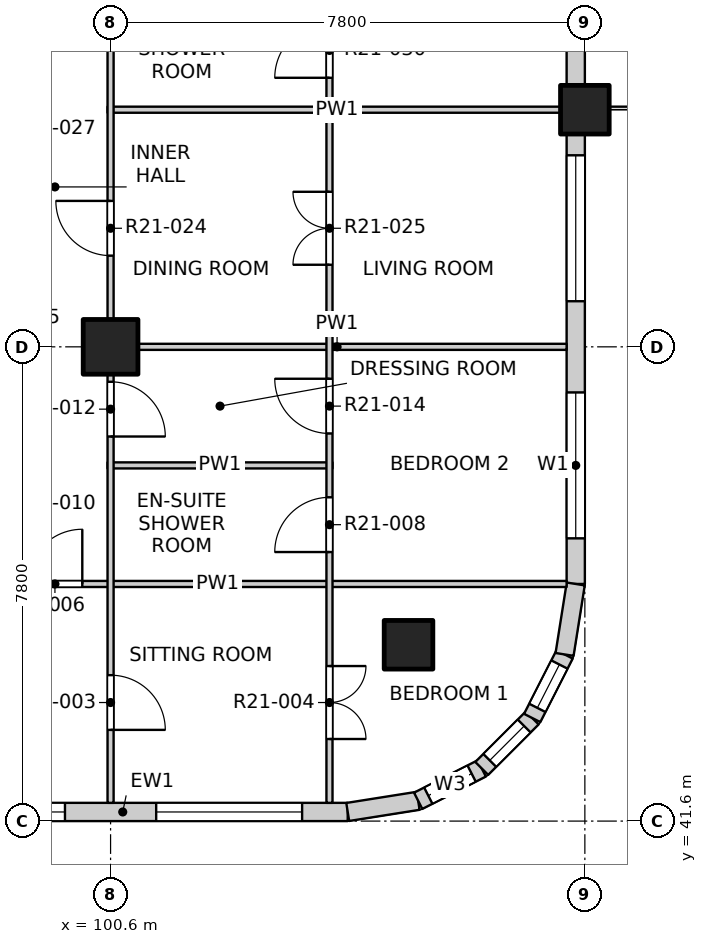
"""IFC4 building model, lengths in metres.
Left out: names, types, materials, properties, quantities, classifications, styles, units other than length and angle.
Written with IfcOpenShell. Run it as: python <this file> out.ifc"""

import sys

from ifc_helpers import new_model, si_unit, direction, frame, frame_2d, origin, origin_2d, place, context, subcontext, project, spatial, rectangle, extrude, element, fill, save


model = new_model("IFC4")
c1 = context("Model", 3, precision=1e-05, world=origin(), true_north=direction((0.0, 1.0)))
c2 = subcontext(c1, "Body", "Model", "MODEL_VIEW")
j1 = project(units=[si_unit("LENGTHUNIT", "METRE"), si_unit("PLANEANGLEUNIT", "RADIAN")], contexts=[c1])
p1 = place(None, origin())
s1 = spatial("IfcSite", under=j1, at=p1, CompositionType="ELEMENT")
p2 = place(p1, origin())
s2 = spatial("IfcBuilding", under=s1, at=p2, CompositionType="ELEMENT")
p3 = place(p2, frame((0.0, 0.0, 221.1)))
s3 = spatial("IfcBuildingStorey", under=s2, at=p3, CompositionType="ELEMENT", Elevation=221.1)
for number, where, z_axis, x_axis in (
    (1, (105.5, 44.5, -0.25), (0.0, 0.0, 1.0), (1.0, 0.0, 0.0)),
    (2, (108.4, 53.3, -0.25), (0.0, 0.0, 1.0), (1.0, 0.0, 0.0)),
):
    element("IfcColumn", number, at=place(p3, frame(where, z_axis=z_axis, x_axis=x_axis)), inside=s3, PredefinedType="COLUMN", context=c2, shape_type="SweptSolid", body=[
        extrude(rectangle(XDim=0.8, YDim=0.8, at=origin_2d()), origin(), (0.0, 0.0, 1.0), 3.4),
    ])
p4 = place(p3, frame((100.6, 49.4, -0.25), z_axis=(0.0, 0.0, 1.0), x_axis=(1.0, 0.0, 0.0)))
e3 = element("IfcColumn", 3, at=p4, inside=s3, PredefinedType="COLUMN", context=c2, shape_type="SweptSolid", body=[
    extrude(rectangle(XDim=0.9, YDim=0.9, at=origin_2d()), origin(), (0.0, 0.0, 1.0), 3.4),
])
p5 = place(p3, frame((97.1, 41.75, 0.0), z_axis=(0.0, 0.0, 1.0), x_axis=(1.0, 0.0, 0.0)))
e4 = element("IfcWall", 4, at=p5, inside=s3, PredefinedType="SOLIDWALL", context=c2, shape_type="SweptSolid", body=[
    extrude(rectangle(XDim=7.4, YDim=0.3, at=frame_2d((3.7, 0.0))), origin(), (0.0, 0.0, 1.0), 2.7),
])
p6 = place(p5, frame((0.35, 0.0, 0.9)))
e5 = element("IfcOpeningElement", 5, at=p6, cuts=e4, PredefinedType="OPENING", context=c2, shape_type="SweptSolid", body=[
    extrude(rectangle(XDim=2.4, YDim=1.8, at=frame_2d((1.2, 0.9))), frame((0.0, 0.16, 0.0), z_axis=(0.0, -1.0, 0.0), x_axis=(1.0, 0.0, 0.0)), (0.0, 0.0, 1.0), 0.32),
])
p7 = place(p5, frame((4.25, 0.0, 0.9)))
e6 = element("IfcOpeningElement", 6, at=p7, cuts=e4, PredefinedType="OPENING", context=c2, shape_type="SweptSolid", body=[
    extrude(rectangle(XDim=2.4, YDim=1.8, at=frame_2d((1.2, 0.9))), frame((0.0, 0.16, 0.0), z_axis=(0.0, -1.0, 0.0), x_axis=(1.0, 0.0, 0.0)), (0.0, 0.0, 1.0), 0.32),
])
p8 = place(p3, frame((108.25, 45.5, 0.0), z_axis=(0.0, 0.0, 1.0), x_axis=(0.0, 1.0, 0.0)))
e7 = element("IfcWall", 7, at=p8, inside=s3, PredefinedType="SOLIDWALL", context=c2, shape_type="SweptSolid", body=[
    extrude(rectangle(XDim=7.4, YDim=0.3, at=frame_2d((3.7, 0.0))), origin(), (0.0, 0.0, 1.0), 2.7),
])
p9 = place(p8, frame((0.75, 0.0, 0.9)))
e8 = element("IfcOpeningElement", 8, at=p9, cuts=e7, PredefinedType="OPENING", context=c2, shape_type="SweptSolid", body=[
    extrude(rectangle(XDim=2.4, YDim=1.8, at=frame_2d((1.2, 0.9))), frame((0.0, 0.16, 0.0), z_axis=(0.0, -1.0, 0.0), x_axis=(1.0, 0.0, 0.0)), (0.0, 0.0, 1.0), 0.32),
])
p10 = place(p8, frame((4.65, 0.0, 0.9)))
e9 = element("IfcOpeningElement", 9, at=p10, cuts=e7, PredefinedType="OPENING", context=c2, shape_type="SweptSolid", body=[
    extrude(rectangle(XDim=2.4, YDim=1.8, at=frame_2d((1.2, 0.9))), frame((0.0, 0.16, 0.0), z_axis=(0.0, -1.0, 0.0), x_axis=(1.0, 0.0, 0.0)), (0.0, 0.0, 1.0), 0.32),
])
p11 = place(p3, frame((108.25, 53.7, 0.0), z_axis=(0.0, 0.0, 1.0), x_axis=(0.0, 1.0, 0.0)))
e10 = element("IfcWall", 10, at=p11, inside=s3, PredefinedType="SOLIDWALL", context=c2, shape_type="SweptSolid", body=[
    extrude(rectangle(XDim=7.0, YDim=0.3, at=frame_2d((3.5, 0.0))), origin(), (0.0, 0.0, 1.0), 2.7),
])
p12 = place(p11, frame((0.65, 0.0, 0.0)))
e11 = element("IfcOpeningElement", 11, at=p12, cuts=e10, PredefinedType="OPENING", context=c2, shape_type="SweptSolid", body=[
    extrude(rectangle(XDim=1.8, YDim=2.4, at=frame_2d((0.9, 1.2))), frame((0.0, 0.16, 0.0), z_axis=(0.0, -1.0, 0.0), x_axis=(1.0, 0.0, 0.0)), (0.0, 0.0, 1.0), 0.32),
])
p13 = place(p11, frame((4.25, 0.0, 0.9)))
e12 = element("IfcOpeningElement", 12, at=p13, cuts=e10, PredefinedType="OPENING", context=c2, shape_type="SweptSolid", body=[
    extrude(rectangle(XDim=2.4, YDim=1.8, at=frame_2d((1.2, 0.9))), frame((0.0, 0.16, 0.0), z_axis=(0.0, -1.0, 0.0), x_axis=(1.0, 0.0, 0.0)), (0.0, 0.0, 1.0), 0.32),
])
p14 = place(p3, frame((104.5, 41.75, 0.0), z_axis=(0.0, 0.0, 1.0), x_axis=(0.987678452879, 0.156496880861, 0.0)))
e13 = element("IfcWall", 13, at=p14, inside=s3, PredefinedType="SOLIDWALL", context=c2, shape_type="SweptSolid", body=[
    extrude(rectangle(XDim=1.173, YDim=0.3, at=frame_2d((0.586, 0.0))), origin(), (0.0, 0.0, 1.0), 2.7),
])
p15 = place(p3, frame((105.659, 41.934, 0.0), z_axis=(0.0, 0.0, 1.0), x_axis=(0.890988677504, 0.454025524128, 0.0)))
e14 = element("IfcWall", 14, at=p15, inside=s3, PredefinedType="SOLIDWALL", context=c2, shape_type="SweptSolid", body=[
    extrude(rectangle(XDim=1.173, YDim=0.3, at=frame_2d((0.587, 0.0))), origin(), (0.0, 0.0, 1.0), 2.7),
])
p16 = place(p15, frame((0.187, 0.0, 0.9)))
e15 = element("IfcOpeningElement", 15, at=p16, cuts=e14, PredefinedType="OPENING", context=c2, shape_type="SweptSolid", body=[
    extrude(rectangle(XDim=0.8, YDim=1.2, at=frame_2d((0.4, 0.6))), frame((0.0, 0.16, 0.0), z_axis=(0.0, -1.0, 0.0), x_axis=(1.0, 0.0, 0.0)), (0.0, 0.0, 1.0), 0.32),
])
p17 = place(p3, frame((106.704, 42.466, 0.0), z_axis=(0.0, 0.0, 1.0), x_axis=(0.707106781187, 0.707106781187, 0.0)))
e16 = element("IfcWall", 16, at=p17, inside=s3, PredefinedType="SOLIDWALL", context=c2, shape_type="SweptSolid", body=[
    extrude(rectangle(XDim=1.173, YDim=0.3, at=frame_2d((0.586, 0.0))), origin(), (0.0, 0.0, 1.0), 2.7),
])
p18 = place(p17, frame((0.187, 0.0, 0.9)))
e17 = element("IfcOpeningElement", 17, at=p18, cuts=e16, PredefinedType="OPENING", context=c2, shape_type="SweptSolid", body=[
    extrude(rectangle(XDim=0.8, YDim=1.2, at=frame_2d((0.4, 0.6))), frame((0.0, 0.16, 0.0), z_axis=(0.0, -1.0, 0.0), x_axis=(1.0, 0.0, 0.0)), (0.0, 0.0, 1.0), 0.32),
])
p19 = place(p3, frame((107.534, 43.296, 0.0), z_axis=(0.0, 0.0, 1.0), x_axis=(0.454025524128, 0.890988677504, 0.0)))
e18 = element("IfcWall", 18, at=p19, inside=s3, PredefinedType="SOLIDWALL", context=c2, shape_type="SweptSolid", body=[
    extrude(rectangle(XDim=1.173, YDim=0.3, at=frame_2d((0.587, 0.0))), origin(), (0.0, 0.0, 1.0), 2.7),
])
p20 = place(p19, frame((0.187, 0.0, 0.9)))
e19 = element("IfcOpeningElement", 19, at=p20, cuts=e18, PredefinedType="OPENING", context=c2, shape_type="SweptSolid", body=[
    extrude(rectangle(XDim=0.8, YDim=1.2, at=frame_2d((0.4, 0.6))), frame((0.0, 0.16, 0.0), z_axis=(0.0, -1.0, 0.0), x_axis=(1.0, 0.0, 0.0)), (0.0, 0.0, 1.0), 0.32),
])
p21 = place(p3, frame((108.066, 44.341, 0.0), z_axis=(0.0, 0.0, 1.0), x_axis=(0.156496880861, 0.987678452879, 0.0)))
e20 = element("IfcWall", 20, at=p21, inside=s3, PredefinedType="SOLIDWALL", context=c2, shape_type="SweptSolid", body=[
    extrude(rectangle(XDim=1.173, YDim=0.3, at=frame_2d((0.586, 0.0))), origin(), (0.0, 0.0, 1.0), 2.7),
])
p22 = place(p3, frame((96.625, 45.5, 0.0), z_axis=(0.0, 0.0, 1.0), x_axis=(1.0, 0.0, 0.0)))
e21 = element("IfcWall", 21, at=p22, inside=s3, PredefinedType="PARTITIONING", context=c2, shape_type="SweptSolid", body=[
    extrude(rectangle(XDim=11.475, YDim=0.1, at=frame_2d((5.738, 0.0))), origin(), (0.0, 0.0, 1.0), 3.15),
])
p23 = place(p22, frame((2.61, 0.0, 0.0)))
e22 = element("IfcOpeningElement", 22, at=p23, cuts=e21, PredefinedType="OPENING", context=c2, shape_type="SweptSolid", body=[
    extrude(rectangle(XDim=0.9, YDim=2.1, at=frame_2d((0.45, 1.05))), frame((0.0, 0.06, 0.0), z_axis=(0.0, -1.0, 0.0), x_axis=(1.0, 0.0, 0.0)), (0.0, 0.0, 1.0), 0.12),
])
p24 = place(p3, frame((100.55, 47.45, 0.0), z_axis=(0.0, 0.0, 1.0), x_axis=(1.0, 0.0, 0.0)))
e23 = element("IfcWall", 23, at=p24, inside=s3, PredefinedType="PARTITIONING", context=c2, shape_type="SweptSolid", body=[
    extrude(rectangle(XDim=3.7, YDim=0.1, at=frame_2d((1.85, 0.0))), origin(), (0.0, 0.0, 1.0), 3.15),
])
for number, where, z_axis, x_axis in (
    (24, (100.55, 49.4, 0.0), (0.0, 0.0, 1.0), (1.0, 0.0, 0.0)),
    (25, (100.55, 53.3, 0.0), (0.0, 0.0, 1.0), (1.0, 0.0, 0.0)),
):
    element("IfcWall", number, at=place(p3, frame(where, z_axis=z_axis, x_axis=x_axis)), inside=s3, PredefinedType="PARTITIONING", context=c2, shape_type="SweptSolid", body=[
        extrude(rectangle(XDim=7.55, YDim=0.1, at=frame_2d((3.775, 0.0))), origin(), (0.0, 0.0, 1.0), 3.15),
    ])
p25 = place(p3, frame((100.6, 41.9, 0.0), z_axis=(0.0, 0.0, 1.0), x_axis=(0.0, 1.0, 0.0)))
e26 = element("IfcWall", 26, at=p25, inside=s3, PredefinedType="PARTITIONING", context=c2, shape_type="SweptSolid", body=[
    extrude(rectangle(XDim=46.2, YDim=0.1, at=frame_2d((23.1, 0.0))), origin(), (0.0, 0.0, 1.0), 3.15),
])
p26 = place(p25, frame((1.2, 0.0, 0.0)))
e27 = element("IfcOpeningElement", 27, at=p26, cuts=e26, PredefinedType="OPENING", context=c2, shape_type="SweptSolid", body=[
    extrude(rectangle(XDim=0.9, YDim=2.1, at=frame_2d((0.45, 1.05))), frame((0.0, 0.06, 0.0), z_axis=(0.0, -1.0, 0.0), x_axis=(1.0, 0.0, 0.0)), (0.0, 0.0, 1.0), 0.12),
])
p27 = place(p25, frame((6.025, 0.0, 0.0)))
e28 = element("IfcOpeningElement", 28, at=p27, cuts=e26, PredefinedType="OPENING", context=c2, shape_type="SweptSolid", body=[
    extrude(rectangle(XDim=0.9, YDim=2.1, at=frame_2d((0.45, 1.05))), frame((0.0, 0.06, 0.0), z_axis=(0.0, -1.0, 0.0), x_axis=(1.0, 0.0, 0.0)), (0.0, 0.0, 1.0), 0.12),
])
p28 = place(p25, frame((9.0, 0.0, 0.0)))
e29 = element("IfcOpeningElement", 29, at=p28, cuts=e26, PredefinedType="OPENING", context=c2, shape_type="SweptSolid", body=[
    extrude(rectangle(XDim=0.9, YDim=2.1, at=frame_2d((0.45, 1.05))), frame((0.0, 0.06, 0.0), z_axis=(0.0, -1.0, 0.0), x_axis=(1.0, 0.0, 0.0)), (0.0, 0.0, 1.0), 0.12),
])
p29 = place(p25, frame((13.85, 0.0, 0.0)))
e30 = element("IfcOpeningElement", 30, at=p29, cuts=e26, PredefinedType="OPENING", context=c2, shape_type="SweptSolid", body=[
    extrude(rectangle(XDim=0.9, YDim=2.1, at=frame_2d((0.45, 1.05))), frame((0.0, 0.06, 0.0), z_axis=(0.0, -1.0, 0.0), x_axis=(1.0, 0.0, 0.0)), (0.0, 0.0, 1.0), 0.12),
])
p30 = place(p25, frame((16.8, 0.0, 0.0)))
e31 = element("IfcOpeningElement", 31, at=p30, cuts=e26, PredefinedType="OPENING", context=c2, shape_type="SweptSolid", body=[
    extrude(rectangle(XDim=0.9, YDim=2.1, at=frame_2d((0.45, 1.05))), frame((0.0, 0.06, 0.0), z_axis=(0.0, -1.0, 0.0), x_axis=(1.0, 0.0, 0.0)), (0.0, 0.0, 1.0), 0.12),
])
p31 = place(p25, frame((21.625, 0.0, 0.0)))
e32 = element("IfcOpeningElement", 32, at=p31, cuts=e26, PredefinedType="OPENING", context=c2, shape_type="SweptSolid", body=[
    extrude(rectangle(XDim=0.9, YDim=2.1, at=frame_2d((0.45, 1.05))), frame((0.0, 0.06, 0.0), z_axis=(0.0, -1.0, 0.0), x_axis=(1.0, 0.0, 0.0)), (0.0, 0.0, 1.0), 0.12),
])
p32 = place(p25, frame((24.6, 0.0, 0.0)))
e33 = element("IfcOpeningElement", 33, at=p32, cuts=e26, PredefinedType="OPENING", context=c2, shape_type="SweptSolid", body=[
    extrude(rectangle(XDim=0.9, YDim=2.1, at=frame_2d((0.45, 1.05))), frame((0.0, 0.06, 0.0), z_axis=(0.0, -1.0, 0.0), x_axis=(1.0, 0.0, 0.0)), (0.0, 0.0, 1.0), 0.12),
])
p33 = place(p25, frame((29.425, 0.0, 0.0)))
e34 = element("IfcOpeningElement", 34, at=p33, cuts=e26, PredefinedType="OPENING", context=c2, shape_type="SweptSolid", body=[
    extrude(rectangle(XDim=0.9, YDim=2.1, at=frame_2d((0.45, 1.05))), frame((0.0, 0.06, 0.0), z_axis=(0.0, -1.0, 0.0), x_axis=(1.0, 0.0, 0.0)), (0.0, 0.0, 1.0), 0.12),
])
p34 = place(p25, frame((33.375, 0.0, 0.0)))
e35 = element("IfcOpeningElement", 35, at=p34, cuts=e26, PredefinedType="OPENING", context=c2, shape_type="SweptSolid", body=[
    extrude(rectangle(XDim=0.9, YDim=2.1, at=frame_2d((0.45, 1.05))), frame((0.0, 0.06, 0.0), z_axis=(0.0, -1.0, 0.0), x_axis=(1.0, 0.0, 0.0)), (0.0, 0.0, 1.0), 0.12),
])
p35 = place(p25, frame((36.3, 0.0, 0.0)))
e36 = element("IfcOpeningElement", 36, at=p35, cuts=e26, PredefinedType="OPENING", context=c2, shape_type="SweptSolid", body=[
    extrude(rectangle(XDim=0.9, YDim=2.1, at=frame_2d((0.45, 1.05))), frame((0.0, 0.06, 0.0), z_axis=(0.0, -1.0, 0.0), x_axis=(1.0, 0.0, 0.0)), (0.0, 0.0, 1.0), 0.12),
])
p36 = place(p25, frame((41.175, 0.0, 0.0)))
e37 = element("IfcOpeningElement", 37, at=p36, cuts=e26, PredefinedType="OPENING", context=c2, shape_type="SweptSolid", body=[
    extrude(rectangle(XDim=0.9, YDim=2.1, at=frame_2d((0.45, 1.05))), frame((0.0, 0.06, 0.0), z_axis=(0.0, -1.0, 0.0), x_axis=(1.0, 0.0, 0.0)), (0.0, 0.0, 1.0), 0.12),
])
p37 = place(p25, frame((44.1, 0.0, 0.0)))
e38 = element("IfcOpeningElement", 38, at=p37, cuts=e26, PredefinedType="OPENING", context=c2, shape_type="SweptSolid", body=[
    extrude(rectangle(XDim=0.9, YDim=2.1, at=frame_2d((0.45, 1.05))), frame((0.0, 0.06, 0.0), z_axis=(0.0, -1.0, 0.0), x_axis=(1.0, 0.0, 0.0)), (0.0, 0.0, 1.0), 0.12),
])
p38 = place(p3, frame((104.2, 41.9, 0.0), z_axis=(0.0, 0.0, 1.0), x_axis=(0.0, 1.0, 0.0)))
e39 = element("IfcWall", 39, at=p38, inside=s3, PredefinedType="PARTITIONING", context=c2, shape_type="SweptSolid", body=[
    extrude(rectangle(XDim=23.0, YDim=0.1, at=frame_2d((11.5, 0.0))), origin(), (0.0, 0.0, 1.0), 3.15),
])
p39 = place(p38, frame((1.05, 0.0, 0.0)))
e40 = element("IfcOpeningElement", 40, at=p39, cuts=e39, PredefinedType="OPENING", context=c2, shape_type="SweptSolid", body=[
    extrude(rectangle(XDim=1.2, YDim=2.1, at=frame_2d((0.6, 1.05))), frame((0.0, 0.06, 0.0), z_axis=(0.0, -1.0, 0.0), x_axis=(1.0, 0.0, 0.0)), (0.0, 0.0, 1.0), 0.12),
])
p40 = place(p38, frame((4.125, 0.0, 0.0)))
e41 = element("IfcOpeningElement", 41, at=p40, cuts=e39, PredefinedType="OPENING", context=c2, shape_type="SweptSolid", body=[
    extrude(rectangle(XDim=0.9, YDim=2.1, at=frame_2d((0.45, 1.05))), frame((0.0, 0.06, 0.0), z_axis=(0.0, -1.0, 0.0), x_axis=(1.0, 0.0, 0.0)), (0.0, 0.0, 1.0), 0.12),
])
p41 = place(p38, frame((6.075, 0.0, 0.0)))
e42 = element("IfcOpeningElement", 42, at=p41, cuts=e39, PredefinedType="OPENING", context=c2, shape_type="SweptSolid", body=[
    extrude(rectangle(XDim=0.9, YDim=2.1, at=frame_2d((0.45, 1.05))), frame((0.0, 0.06, 0.0), z_axis=(0.0, -1.0, 0.0), x_axis=(1.0, 0.0, 0.0)), (0.0, 0.0, 1.0), 0.12),
])
p42 = place(p38, frame((8.85, 0.0, 0.0)))
e43 = element("IfcOpeningElement", 43, at=p42, cuts=e39, PredefinedType="OPENING", context=c2, shape_type="SweptSolid", body=[
    extrude(rectangle(XDim=1.2, YDim=2.1, at=frame_2d((0.6, 1.05))), frame((0.0, 0.06, 0.0), z_axis=(0.0, -1.0, 0.0), x_axis=(1.0, 0.0, 0.0)), (0.0, 0.0, 1.0), 0.12),
])
p43 = place(p38, frame((11.925, 0.0, 0.0)))
e44 = element("IfcOpeningElement", 44, at=p43, cuts=e39, PredefinedType="OPENING", context=c2, shape_type="SweptSolid", body=[
    extrude(rectangle(XDim=0.9, YDim=2.1, at=frame_2d((0.45, 1.05))), frame((0.0, 0.06, 0.0), z_axis=(0.0, -1.0, 0.0), x_axis=(1.0, 0.0, 0.0)), (0.0, 0.0, 1.0), 0.12),
])
p44 = place(p38, frame((13.875, 0.0, 0.0)))
e45 = element("IfcOpeningElement", 45, at=p44, cuts=e39, PredefinedType="OPENING", context=c2, shape_type="SweptSolid", body=[
    extrude(rectangle(XDim=0.9, YDim=2.1, at=frame_2d((0.45, 1.05))), frame((0.0, 0.06, 0.0), z_axis=(0.0, -1.0, 0.0), x_axis=(1.0, 0.0, 0.0)), (0.0, 0.0, 1.0), 0.12),
])
p45 = place(p38, frame((16.65, 0.0, 0.0)))
e46 = element("IfcOpeningElement", 46, at=p45, cuts=e39, PredefinedType="OPENING", context=c2, shape_type="SweptSolid", body=[
    extrude(rectangle(XDim=1.2, YDim=2.1, at=frame_2d((0.6, 1.05))), frame((0.0, 0.06, 0.0), z_axis=(0.0, -1.0, 0.0), x_axis=(1.0, 0.0, 0.0)), (0.0, 0.0, 1.0), 0.12),
])
p46 = place(p38, frame((19.725, 0.0, 0.0)))
e47 = element("IfcOpeningElement", 47, at=p46, cuts=e39, PredefinedType="OPENING", context=c2, shape_type="SweptSolid", body=[
    extrude(rectangle(XDim=0.9, YDim=2.1, at=frame_2d((0.45, 1.05))), frame((0.0, 0.06, 0.0), z_axis=(0.0, -1.0, 0.0), x_axis=(1.0, 0.0, 0.0)), (0.0, 0.0, 1.0), 0.12),
])
p47 = place(p38, frame((21.675, 0.0, 0.0)))
e48 = element("IfcOpeningElement", 48, at=p47, cuts=e39, PredefinedType="OPENING", context=c2, shape_type="SweptSolid", body=[
    extrude(rectangle(XDim=0.9, YDim=2.1, at=frame_2d((0.45, 1.05))), frame((0.0, 0.06, 0.0), z_axis=(0.0, -1.0, 0.0), x_axis=(1.0, 0.0, 0.0)), (0.0, 0.0, 1.0), 0.12),
])
p48 = place(p6, origin())
e49 = element("IfcWindow", 49, at=p48, inside=s3, PartitioningType="DOUBLE_PANEL_VERTICAL", PredefinedType="WINDOW", context=c2, shape_type="SweptSolid", body=[
    extrude(rectangle(XDim=2.4, YDim=1.8, at=frame_2d((1.2, 0.9))), frame((0.0, 0.03, 0.0), z_axis=(0.0, -1.0, 0.0), x_axis=(1.0, 0.0, 0.0)), (0.0, 0.0, 1.0), 0.06),
])
fill(e5, e49)
p49 = place(p7, origin())
e50 = element("IfcWindow", 50, at=p49, inside=s3, PartitioningType="DOUBLE_PANEL_VERTICAL", PredefinedType="WINDOW", context=c2, shape_type="SweptSolid", body=[
    extrude(rectangle(XDim=2.4, YDim=1.8, at=frame_2d((1.2, 0.9))), frame((0.0, 0.03, 0.0), z_axis=(0.0, -1.0, 0.0), x_axis=(1.0, 0.0, 0.0)), (0.0, 0.0, 1.0), 0.06),
])
fill(e6, e50)
p50 = place(p9, origin())
e51 = element("IfcWindow", 51, at=p50, inside=s3, PartitioningType="DOUBLE_PANEL_VERTICAL", PredefinedType="WINDOW", context=c2, shape_type="SweptSolid", body=[
    extrude(rectangle(XDim=2.4, YDim=1.8, at=frame_2d((1.2, 0.9))), frame((0.0, 0.03, 0.0), z_axis=(0.0, -1.0, 0.0), x_axis=(1.0, 0.0, 0.0)), (0.0, 0.0, 1.0), 0.06),
])
fill(e8, e51)
p51 = place(p10, origin())
e52 = element("IfcWindow", 52, at=p51, inside=s3, PartitioningType="DOUBLE_PANEL_VERTICAL", PredefinedType="WINDOW", context=c2, shape_type="SweptSolid", body=[
    extrude(rectangle(XDim=2.4, YDim=1.8, at=frame_2d((1.2, 0.9))), frame((0.0, 0.03, 0.0), z_axis=(0.0, -1.0, 0.0), x_axis=(1.0, 0.0, 0.0)), (0.0, 0.0, 1.0), 0.06),
])
fill(e9, e52)
p52 = place(p16, origin())
e53 = element("IfcWindow", 53, at=p52, inside=s3, PartitioningType="SINGLE_PANEL", PredefinedType="WINDOW", context=c2, shape_type="SweptSolid", body=[
    extrude(rectangle(XDim=0.8, YDim=1.2, at=frame_2d((0.4, 0.6))), frame((0.0, 0.03, 0.0), z_axis=(0.0, -1.0, 0.0), x_axis=(1.0, 0.0, 0.0)), (0.0, 0.0, 1.0), 0.06),
])
fill(e15, e53)
p53 = place(p18, origin())
e54 = element("IfcWindow", 54, at=p53, inside=s3, PartitioningType="SINGLE_PANEL", PredefinedType="WINDOW", context=c2, shape_type="SweptSolid", body=[
    extrude(rectangle(XDim=0.8, YDim=1.2, at=frame_2d((0.4, 0.6))), frame((0.0, 0.03, 0.0), z_axis=(0.0, -1.0, 0.0), x_axis=(1.0, 0.0, 0.0)), (0.0, 0.0, 1.0), 0.06),
])
fill(e17, e54)
p54 = place(p20, origin())
e55 = element("IfcWindow", 55, at=p54, inside=s3, PartitioningType="SINGLE_PANEL", PredefinedType="WINDOW", context=c2, shape_type="SweptSolid", body=[
    extrude(rectangle(XDim=0.8, YDim=1.2, at=frame_2d((0.4, 0.6))), frame((0.0, 0.03, 0.0), z_axis=(0.0, -1.0, 0.0), x_axis=(1.0, 0.0, 0.0)), (0.0, 0.0, 1.0), 0.06),
])
fill(e19, e55)
p55 = place(p26, origin())
e56 = element("IfcDoor", 56, at=p55, inside=s3, OperationType="SINGLE_SWING_RIGHT", PredefinedType="DOOR", context=c2, shape_type="SweptSolid", body=[
    extrude(rectangle(XDim=0.9, YDim=2.1, at=frame_2d((0.45, 1.05))), frame((0.0, 0.025, 0.0), z_axis=(0.0, -1.0, 0.0), x_axis=(1.0, 0.0, 0.0)), (0.0, 0.0, 1.0), 0.05),
])
fill(e27, e56)
p56 = place(p39, origin())
e57 = element("IfcDoor", 57, at=p56, inside=s3, OperationType="DOUBLE_DOOR_SINGLE_SWING", PredefinedType="DOOR", context=c2, shape_type="SweptSolid", body=[
    extrude(rectangle(XDim=1.2, YDim=2.1, at=frame_2d((0.6, 1.05))), frame((0.0, 0.025, 0.0), z_axis=(0.0, -1.0, 0.0), x_axis=(1.0, 0.0, 0.0)), (0.0, 0.0, 1.0), 0.05),
])
fill(e40, e57)
p57 = place(p23, origin())
e58 = element("IfcDoor", 58, at=p57, inside=s3, OperationType="SINGLE_SWING_RIGHT", PredefinedType="DOOR", context=c2, shape_type="SweptSolid", body=[
    extrude(rectangle(XDim=0.9, YDim=2.1, at=frame_2d((0.45, 1.05))), frame((0.0, 0.025, 0.0), z_axis=(0.0, -1.0, 0.0), x_axis=(1.0, 0.0, 0.0)), (0.0, 0.0, 1.0), 0.05),
])
fill(e22, e58)
p58 = place(p40, origin())
e59 = element("IfcDoor", 59, at=p58, inside=s3, OperationType="SINGLE_SWING_LEFT", PredefinedType="DOOR", context=c2, shape_type="SweptSolid", body=[
    extrude(rectangle(XDim=0.9, YDim=2.1, at=frame_2d((0.45, 1.05))), frame((0.0, 0.025, 0.0), z_axis=(0.0, -1.0, 0.0), x_axis=(1.0, 0.0, 0.0)), (0.0, 0.0, 1.0), 0.05),
])
fill(e41, e59)
p59 = place(p27, origin())
e60 = element("IfcDoor", 60, at=p59, inside=s3, OperationType="SINGLE_SWING_RIGHT", PredefinedType="DOOR", context=c2, shape_type="SweptSolid", body=[
    extrude(rectangle(XDim=0.9, YDim=2.1, at=frame_2d((0.45, 1.05))), frame((0.0, 0.025, 0.0), z_axis=(0.0, -1.0, 0.0), x_axis=(1.0, 0.0, 0.0)), (0.0, 0.0, 1.0), 0.05),
])
fill(e28, e60)
p60 = place(p41, origin())
e61 = element("IfcDoor", 61, at=p60, inside=s3, OperationType="SINGLE_SWING_RIGHT", PredefinedType="DOOR", context=c2, shape_type="SweptSolid", body=[
    extrude(rectangle(XDim=0.9, YDim=2.1, at=frame_2d((0.45, 1.05))), frame((0.0, 0.025, 0.0), z_axis=(0.0, -1.0, 0.0), x_axis=(1.0, 0.0, 0.0)), (0.0, 0.0, 1.0), 0.05),
])
fill(e42, e61)
p61 = place(p28, origin())
e62 = element("IfcDoor", 62, at=p61, inside=s3, OperationType="SINGLE_SWING_RIGHT", PredefinedType="DOOR", context=c2, shape_type="SweptSolid", body=[
    extrude(rectangle(XDim=0.9, YDim=2.1, at=frame_2d((0.45, 1.05))), frame((0.0, 0.025, 0.0), z_axis=(0.0, -1.0, 0.0), x_axis=(1.0, 0.0, 0.0)), (0.0, 0.0, 1.0), 0.05),
])
fill(e29, e62)
p62 = place(p42, origin())
e63 = element("IfcDoor", 63, at=p62, inside=s3, OperationType="DOUBLE_DOOR_SINGLE_SWING", PredefinedType="DOOR", context=c2, shape_type="SweptSolid", body=[
    extrude(rectangle(XDim=1.2, YDim=2.1, at=frame_2d((0.6, 1.05))), frame((0.0, 0.025, 0.0), z_axis=(0.0, -1.0, 0.0), x_axis=(1.0, 0.0, 0.0)), (0.0, 0.0, 1.0), 0.05),
])
fill(e43, e63)
p63 = place(p43, origin())
e64 = element("IfcDoor", 64, at=p63, inside=s3, OperationType="SINGLE_SWING_LEFT", PredefinedType="DOOR", context=c2, shape_type="SweptSolid", body=[
    extrude(rectangle(XDim=0.9, YDim=2.1, at=frame_2d((0.45, 1.05))), frame((0.0, 0.025, 0.0), z_axis=(0.0, -1.0, 0.0), x_axis=(1.0, 0.0, 0.0)), (0.0, 0.0, 1.0), 0.05),
])
fill(e44, e64)
save(model, sys.argv[1])
